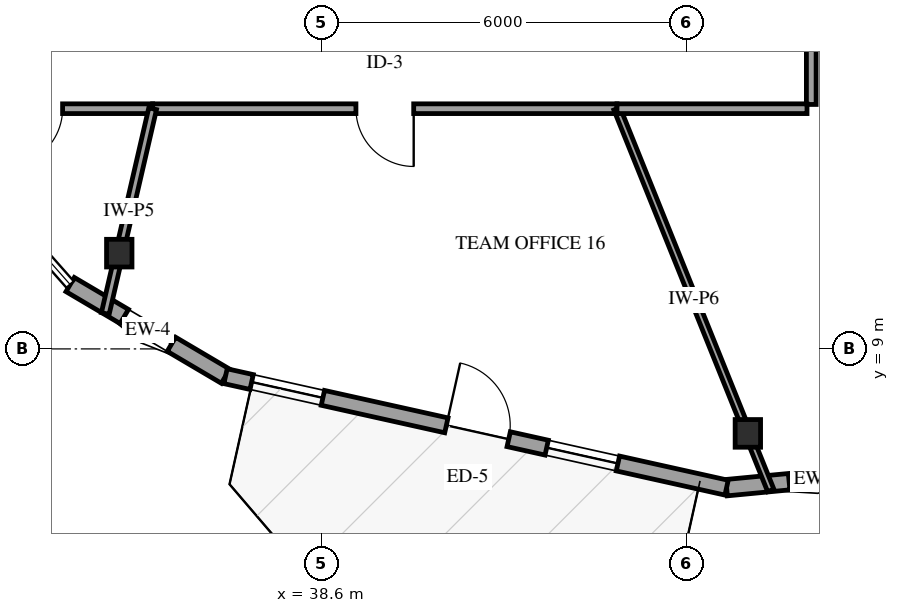
"""IFC4 building model, lengths in metres.
Left out: names, types, materials, properties, quantities, classifications, styles, units other than length and angle.
Written with IfcOpenShell. Run it as: python <this file> out.ifc"""

import sys

from ifc_helpers import new_model, si_unit, direction, frame, frame_2d, origin, origin_2d, place, context, subcontext, project, spatial, rectangle, i_section, extrude, element, fill, save


model = new_model("IFC4")
c1 = context("Model", 3, precision=1e-05, world=origin(), true_north=direction((0.0, 1.0)))
c2 = subcontext(c1, "Body", "Model", "MODEL_VIEW")
j1 = project(units=[si_unit("LENGTHUNIT", "METRE"), si_unit("PLANEANGLEUNIT", "RADIAN")], contexts=[c1])
p1 = place(None, origin())
s1 = spatial("IfcSite", under=j1, at=p1, CompositionType="ELEMENT")
p2 = place(p1, origin())
s2 = spatial("IfcBuilding", under=s1, at=p2, CompositionType="ELEMENT")
p3 = place(p2, frame((0.0, 0.0, 118.6)))
s3 = spatial("IfcBuildingStorey", under=s2, at=p3, CompositionType="ELEMENT", Elevation=118.6)
for number, where, z_axis, x_axis in (
    (1, (35.27, 10.575, 0.0), (0.0, 0.0, 1.0), (1.0, 0.0, 0.0)),
    (2, (45.607, 7.611, 0.0), (0.0, 0.0, 1.0), (1.0, 0.0, 0.0)),
):
    element("IfcColumn", number, at=place(p3, frame(where, z_axis=z_axis, x_axis=x_axis)), inside=s3, PredefinedType="COLUMN", context=c2, shape_type="SweptSolid", body=[
        extrude(i_section(OverallWidth=0.418, OverallDepth=0.455, WebThickness=0.042, FlangeThickness=0.068, FilletRadius=0.038, at=origin_2d()), origin(), (0.0, 0.0, 1.0), 3.9),
    ])
p4 = place(p3, frame((34.462, 10.058, 0.0), z_axis=(0.0, 0.0, 1.0), x_axis=(0.861303111476, -0.508091478144, 0.0)))
e3 = element("IfcWall", 3, at=p4, inside=s3, PredefinedType="SOLIDWALL", context=c2, shape_type="SweptSolid", body=[
    extrude(rectangle(XDim=2.967, YDim=0.27, at=frame_2d((1.483, 0.0))), origin(), (0.0, 0.0, 1.0), 2.979),
])
p5 = place(p4, frame((1.033, 0.0, 0.75)))
e4 = element("IfcOpeningElement", 4, at=p5, cuts=e3, PredefinedType="OPENING", context=c2, shape_type="SweptSolid", body=[
    extrude(rectangle(XDim=0.9, YDim=1.5, at=frame_2d((0.45, 0.75))), frame((0.0, 0.145, 0.0), z_axis=(0.0, -1.0, 0.0), x_axis=(1.0, 0.0, 0.0)), (0.0, 0.0, 1.0), 0.29),
])
p6 = place(p3, frame((45.257, 6.718, 0.0), z_axis=(0.0, 0.0, 1.0), x_axis=(0.995464349716, 0.095135316491, 0.0)))
e5 = element("IfcWall", 5, at=p6, inside=s3, PredefinedType="SOLIDWALL", context=c2, shape_type="SweptSolid", body=[
    extrude(rectangle(XDim=2.967, YDim=0.27, at=frame_2d((1.483, 0.0))), origin(), (0.0, 0.0, 1.0), 2.979),
])
p7 = place(p6, frame((1.033, 0.0, 0.75)))
e6 = element("IfcOpeningElement", 6, at=p7, cuts=e5, PredefinedType="OPENING", context=c2, shape_type="SweptSolid", body=[
    extrude(rectangle(XDim=0.9, YDim=1.5, at=frame_2d((0.45, 0.75))), frame((0.0, 0.145, 0.0), z_axis=(0.0, -1.0, 0.0), x_axis=(1.0, 0.0, 0.0)), (0.0, 0.0, 1.0), 0.29),
])
p8 = place(p3, frame((37.018, 8.551, 0.0), z_axis=(0.0, 0.0, 1.0), x_axis=(0.976144167336, -0.217123385606, 0.0)))
e7 = element("IfcWall", 7, at=p8, inside=s3, PredefinedType="SOLIDWALL", context=c2, shape_type="SweptSolid", body=[
    extrude(rectangle(XDim=8.441, YDim=0.25, at=frame_2d((4.221, 0.0))), origin(), (0.0, 0.0, 1.0), 2.979),
])
p9 = place(p8, frame((3.721, 0.0, 0.0)))
e8 = element("IfcOpeningElement", 8, at=p9, cuts=e7, PredefinedType="OPENING", context=c2, shape_type="SweptSolid", body=[
    extrude(rectangle(XDim=1.05, YDim=2.15, at=frame_2d((0.525, 1.075))), frame((0.0, 0.135, 0.0), z_axis=(0.0, -1.0, 0.0), x_axis=(1.0, 0.0, 0.0)), (0.0, 0.0, 1.0), 0.27),
])
p10 = place(p8, frame((0.44, 0.0, 0.72)))
e9 = element("IfcOpeningElement", 9, at=p10, cuts=e7, PredefinedType="OPENING", context=c2, shape_type="SweptSolid", body=[
    extrude(rectangle(XDim=1.2, YDim=1.6, at=frame_2d((0.6, 0.8))), frame((0.0, 0.135, 0.0), z_axis=(0.0, -1.0, 0.0), x_axis=(1.0, 0.0, 0.0)), (0.0, 0.0, 1.0), 0.27),
])
p11 = place(p8, frame((5.411, 0.0, 0.72)))
e10 = element("IfcOpeningElement", 10, at=p11, cuts=e7, PredefinedType="OPENING", context=c2, shape_type="SweptSolid", body=[
    extrude(rectangle(XDim=1.2, YDim=1.6, at=frame_2d((0.6, 0.8))), frame((0.0, 0.135, 0.0), z_axis=(0.0, -1.0, 0.0), x_axis=(1.0, 0.0, 0.0)), (0.0, 0.0, 1.0), 0.27),
])
p12 = place(p3, frame((46.65, 23.33, 0.0), z_axis=(0.0, 0.0, 1.0), x_axis=(0.0, -1.0, 0.0)))
e11 = element("IfcWall", 11, at=p12, inside=s3, PredefinedType="PARTITIONING", context=c2, shape_type="SweptSolid", body=[
    extrude(rectangle(XDim=10.31, YDim=0.16, at=frame_2d((5.155, 0.0))), origin(), (0.0, 0.0, 1.0), 3.6),
])
p13 = place(p12, frame((4.68, 0.0, 0.0)))
e12 = element("IfcOpeningElement", 12, at=p13, cuts=e11, PredefinedType="OPENING", context=c2, shape_type="SweptSolid", body=[
    extrude(rectangle(XDim=0.95, YDim=2.15, at=frame_2d((0.475, 1.075))), frame((0.0, 0.09, 0.0), z_axis=(0.0, -1.0, 0.0), x_axis=(1.0, 0.0, 0.0)), (0.0, 0.0, 1.0), 0.18),
])
p14 = place(p3, frame((43.455, 12.95, 0.0), z_axis=(0.0, 0.0, 1.0), x_axis=(-1.0, 0.0, 0.0)))
e13 = element("IfcWall", 13, at=p14, inside=s3, PredefinedType="PARTITIONING", context=c2, shape_type="SweptSolid", body=[
    extrude(rectangle(XDim=7.636, YDim=0.16, at=frame_2d((3.818, 0.0))), origin(), (0.0, 0.0, 1.0), 3.6),
])
p15 = place(p14, frame((3.343, 0.0, 0.0)))
e14 = element("IfcOpeningElement", 14, at=p15, cuts=e13, PredefinedType="OPENING", context=c2, shape_type="SweptSolid", body=[
    extrude(rectangle(XDim=0.95, YDim=2.15, at=frame_2d((0.475, 1.075))), frame((0.0, 0.09, 0.0), z_axis=(0.0, -1.0, 0.0), x_axis=(1.0, 0.0, 0.0)), (0.0, 0.0, 1.0), 0.18),
])
p16 = place(p3, frame((43.455, 12.95, 0.0), z_axis=(0.0, 0.0, 1.0), x_axis=(0.37369103283, -0.927553239433, 0.0)))
e15 = element("IfcWall", 15, at=p16, inside=s3, PredefinedType="PARTITIONING", context=c2, shape_type="SweptSolid", body=[
    extrude(rectangle(XDim=6.767, YDim=0.11, at=frame_2d((3.384, 0.0))), origin(), (0.0, 0.0, 1.0), 2.895),
])
p17 = place(p3, frame((35.819, 12.95, 0.0), z_axis=(0.0, 0.0, 1.0), x_axis=(-1.0, 0.0, 0.0)))
e16 = element("IfcWall", 16, at=p17, inside=s3, PredefinedType="PARTITIONING", context=c2, shape_type="SweptSolid", body=[
    extrude(rectangle(XDim=3.911, YDim=0.16, at=frame_2d((1.956, 0.0))), origin(), (0.0, 0.0, 1.0), 3.6),
])
p18 = place(p17, frame((1.481, 0.0, 0.0)))
e17 = element("IfcOpeningElement", 17, at=p18, cuts=e16, PredefinedType="OPENING", context=c2, shape_type="SweptSolid", body=[
    extrude(rectangle(XDim=0.95, YDim=2.15, at=frame_2d((0.475, 1.075))), frame((0.0, 0.09, 0.0), z_axis=(0.0, -1.0, 0.0), x_axis=(1.0, 0.0, 0.0)), (0.0, 0.0, 1.0), 0.18),
])
p19 = place(p3, frame((35.819, 12.95, 0.0), z_axis=(0.0, 0.0, 1.0), x_axis=(-0.225364962309, -0.974274413994, 0.0)))
e18 = element("IfcWall", 18, at=p19, inside=s3, PredefinedType="PARTITIONING", context=c2, shape_type="SweptSolid", body=[
    extrude(rectangle(XDim=3.457, YDim=0.13, at=frame_2d((1.729, 0.0))), origin(), (0.0, 0.0, 1.0), 2.895),
])
p20 = place(p3, frame((46.58, 12.95, 0.0), z_axis=(0.0, 0.0, 1.0), x_axis=(-1.0, 0.0, 0.0)))
e19 = element("IfcWall", 19, at=p20, inside=s3, PredefinedType="PARTITIONING", context=c2, shape_type="SweptSolid", body=[
    extrude(rectangle(XDim=3.125, YDim=0.16, at=frame_2d((1.562, 0.0))), origin(), (0.0, 0.0, 1.0), 3.6),
])
p21 = place(p5, origin())
e20 = element("IfcWindow", 20, at=p21, inside=s3, PartitioningType="SINGLE_PANEL", PredefinedType="WINDOW", context=c2, shape_type="SweptSolid", body=[
    extrude(rectangle(XDim=0.9, YDim=1.5, at=frame_2d((0.45, 0.75))), frame((0.0, 0.03, 0.0), z_axis=(0.0, -1.0, 0.0), x_axis=(1.0, 0.0, 0.0)), (0.0, 0.0, 1.0), 0.06),
])
fill(e4, e20)
p22 = place(p7, origin())
e21 = element("IfcWindow", 21, at=p22, inside=s3, PartitioningType="SINGLE_PANEL", PredefinedType="WINDOW", context=c2, shape_type="SweptSolid", body=[
    extrude(rectangle(XDim=0.9, YDim=1.5, at=frame_2d((0.45, 0.75))), frame((0.0, 0.03, 0.0), z_axis=(0.0, -1.0, 0.0), x_axis=(1.0, 0.0, 0.0)), (0.0, 0.0, 1.0), 0.06),
])
fill(e6, e21)
p23 = place(p9, origin())
e22 = element("IfcDoor", 22, at=p23, inside=s3, OperationType="SINGLE_SWING_LEFT", PredefinedType="DOOR", context=c2, shape_type="SweptSolid", body=[
    extrude(rectangle(XDim=1.05, YDim=2.15, at=frame_2d((0.525, 1.075))), frame((0.0, 0.025, 0.0), z_axis=(0.0, -1.0, 0.0), x_axis=(1.0, 0.0, 0.0)), (0.0, 0.0, 1.0), 0.05),
])
fill(e8, e22)
p24 = place(p10, origin())
e23 = element("IfcWindow", 23, at=p24, inside=s3, PartitioningType="SINGLE_PANEL", PredefinedType="WINDOW", context=c2, shape_type="SweptSolid", body=[
    extrude(rectangle(XDim=1.2, YDim=1.6, at=frame_2d((0.6, 0.8))), frame((0.0, 0.03, 0.0), z_axis=(0.0, -1.0, 0.0), x_axis=(1.0, 0.0, 0.0)), (0.0, 0.0, 1.0), 0.06),
])
fill(e9, e23)
p25 = place(p11, origin())
e24 = element("IfcWindow", 24, at=p25, inside=s3, PartitioningType="SINGLE_PANEL", PredefinedType="WINDOW", context=c2, shape_type="SweptSolid", body=[
    extrude(rectangle(XDim=1.2, YDim=1.6, at=frame_2d((0.6, 0.8))), frame((0.0, 0.03, 0.0), z_axis=(0.0, -1.0, 0.0), x_axis=(1.0, 0.0, 0.0)), (0.0, 0.0, 1.0), 0.06),
])
fill(e10, e24)
p26 = place(p15, origin())
e25 = element("IfcDoor", 25, at=p26, inside=s3, OperationType="SINGLE_SWING_LEFT", PredefinedType="DOOR", context=c2, shape_type="SweptSolid", body=[
    extrude(rectangle(XDim=0.95, YDim=2.15, at=frame_2d((0.475, 1.075))), frame((0.0, 0.025, 0.0), z_axis=(0.0, -1.0, 0.0), x_axis=(1.0, 0.0, 0.0)), (0.0, 0.0, 1.0), 0.05),
])
fill(e14, e25)
p27 = place(p18, origin())
e26 = element("IfcDoor", 26, at=p27, inside=s3, OperationType="SINGLE_SWING_RIGHT", PredefinedType="DOOR", context=c2, shape_type="SweptSolid", body=[
    extrude(rectangle(XDim=0.95, YDim=2.15, at=frame_2d((0.475, 1.075))), frame((0.0, 0.025, 0.0), z_axis=(0.0, -1.0, 0.0), x_axis=(1.0, 0.0, 0.0)), (0.0, 0.0, 1.0), 0.05),
])
fill(e17, e26)
save(model, sys.argv[1])
